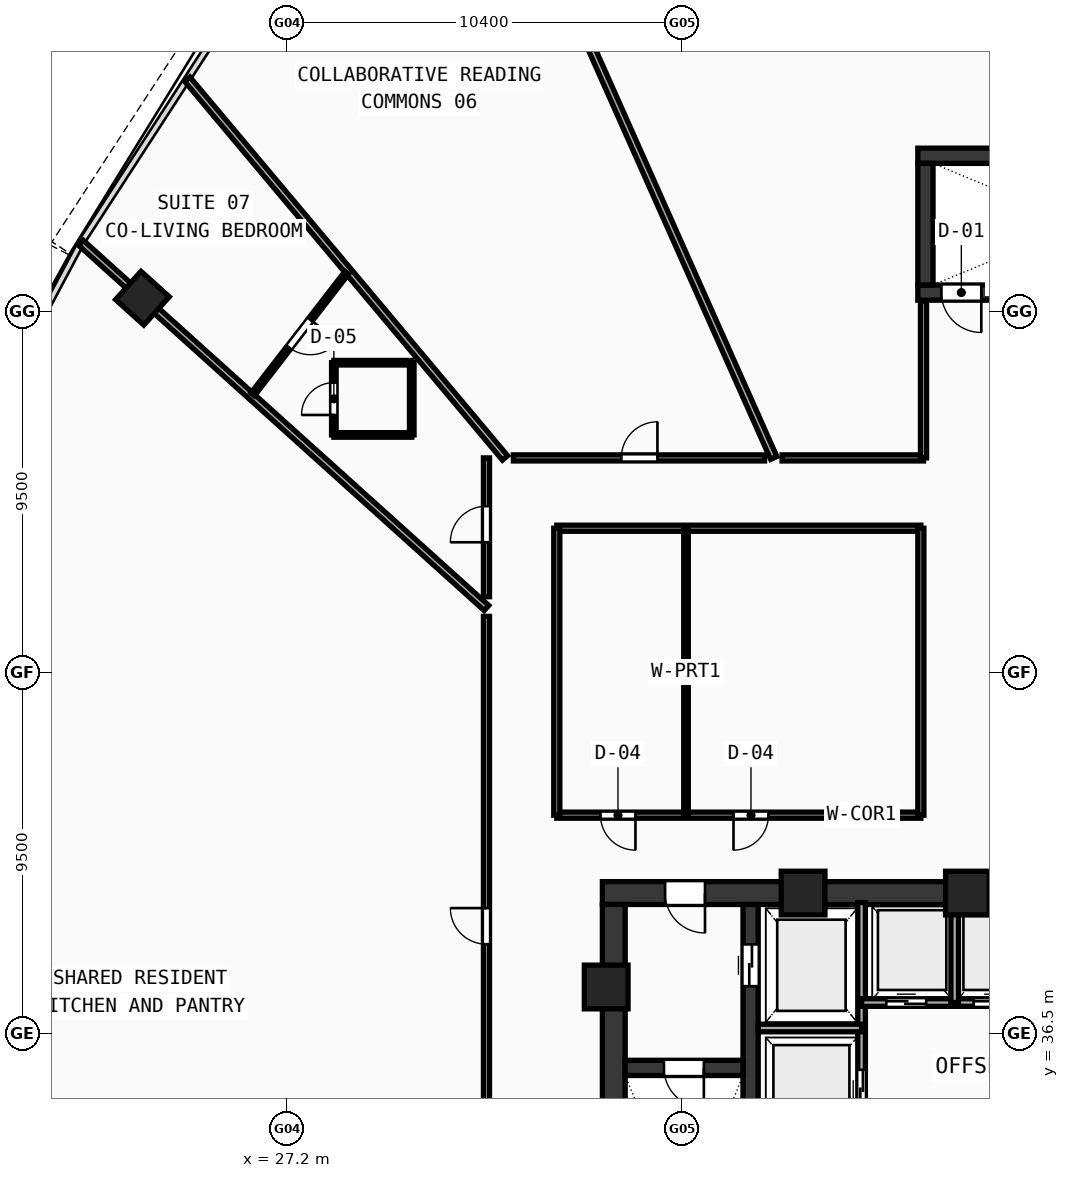
"""IFC4 building model, lengths in metres.
Left out: names, types, materials, properties, quantities, classifications, styles, units other than length and angle.
Written with IfcOpenShell. Run it as: python <this file> out.ifc"""

import sys

from ifc_helpers import new_model, si_unit, direction, frame, frame_2d, origin, origin_with_axes, origin_2d, place, context, subcontext, project, spatial, rectangle, hollow_rectangle, extrude, source, transform, mapped, element, fill, save


model = new_model("IFC4")
c1 = context("Model", 3, precision=1e-05, world=origin(), true_north=direction((0.0, 1.0)))
c2 = subcontext(c1, "Body", "Model", "MODEL_VIEW")
j1 = project(units=[si_unit("LENGTHUNIT", "METRE"), si_unit("PLANEANGLEUNIT", "RADIAN")], contexts=[c1])
p1 = place(None, origin())
s1 = spatial("IfcSite", under=j1, at=p1, CompositionType="ELEMENT")
p2 = place(p1, origin())
s2 = spatial("IfcBuilding", under=s1, at=p2, CompositionType="ELEMENT")
p3 = place(p2, frame((0.0, 0.0, 88.78)))
s3 = spatial("IfcBuildingStorey", under=s2, at=p3, CompositionType="ELEMENT", Elevation=88.78)
p4 = place(p3, frame((35.5, 40.2, 0.0), z_axis=(0.0, 0.0, 1.0), x_axis=(1.0, 0.0, 0.0)))
e1 = element("IfcWall", 1, at=p4, inside=s3, PredefinedType="SHEAR", context=c2, shape_type="SweptSolid", body=[
    extrude(rectangle(XDim=11.3, YDim=0.6, at=frame_2d((5.65, 0.0))), origin(), (0.0, 0.0, 1.0), 3.54),
])
p5 = place(p4, frame((1.65, 0.0, 0.0)))
e2 = element("IfcOpeningElement", 2, at=p5, cuts=e1, PredefinedType="OPENING", context=c2, shape_type="SweptSolid", body=[
    extrude(rectangle(XDim=1.05, YDim=2.1, at=frame_2d((0.525, 1.05))), frame((0.0, 0.31, 0.0), z_axis=(0.0, -1.0, 0.0), x_axis=(1.0, 0.0, 0.0)), (0.0, 0.0, 1.0), 0.62),
])
p6 = place(p3, frame((35.8, 27.8, 0.0), z_axis=(0.0, 0.0, 1.0), x_axis=(0.0, 1.0, 0.0)))
e3 = element("IfcWall", 3, at=p6, inside=s3, PredefinedType="SHEAR", context=c2, shape_type="SweptSolid", body=[
    extrude(rectangle(XDim=12.1, YDim=0.6, at=frame_2d((6.05, 0.0))), origin(), (0.0, 0.0, 1.0), 3.54),
])
p7 = place(p3, frame((39.4, 27.8, 0.0), z_axis=(0.0, 0.0, 1.0), x_axis=(0.0, 1.0, 0.0)))
e4 = element("IfcWall", 4, at=p7, inside=s3, PredefinedType="SHEAR", context=c2, shape_type="SweptSolid", body=[
    extrude(rectangle(XDim=12.1, YDim=0.4, at=frame_2d((6.05, 0.0))), origin(), (0.0, 0.0, 1.0), 3.54),
])
p8 = place(p7, frame((9.95, 0.0, 0.0)))
e5 = element("IfcOpeningElement", 5, at=p8, cuts=e4, PredefinedType="OPENING", context=c2, shape_type="SweptSolid", body=[
    extrude(rectangle(XDim=1.1, YDim=2.1, at=frame_2d((0.55, 1.05))), frame((0.0, 0.21, 0.0), z_axis=(0.0, -1.0, 0.0), x_axis=(1.0, 0.0, 0.0)), (0.0, 0.0, 1.0), 0.42),
])
p9 = place(p3, frame((36.1, 35.6, 0.0), z_axis=(0.0, 0.0, 1.0), x_axis=(1.0, 0.0, 0.0)))
e6 = element("IfcWall", 6, at=p9, inside=s3, PredefinedType="SHEAR", context=c2, shape_type="SweptSolid", body=[
    extrude(rectangle(XDim=3.1, YDim=0.4, at=frame_2d((1.55, 0.0))), origin(), (0.0, 0.0, 1.0), 3.54),
])
p10 = place(p9, frame((1.02, 0.0, 0.0)))
e7 = element("IfcOpeningElement", 7, at=p10, cuts=e6, PredefinedType="OPENING", context=c2, shape_type="SweptSolid", body=[
    extrude(rectangle(XDim=1.05, YDim=2.1, at=frame_2d((0.525, 1.05))), frame((0.0, 0.21, 0.0), z_axis=(0.0, -1.0, 0.0), x_axis=(1.0, 0.0, 0.0)), (0.0, 0.0, 1.0), 0.42),
])
p11 = place(p3, frame((43.8, 59.6, 0.0), z_axis=(0.0, 0.0, 1.0), x_axis=(1.0, 0.0, 0.0)))
e8 = element("IfcWall", 8, at=p11, inside=s3, PredefinedType="SHEAR", context=c2, shape_type="SweptSolid", body=[
    extrude(rectangle(XDim=8.5, YDim=0.4, at=frame_2d((4.25, 0.0))), origin(), (0.0, 0.0, 1.0), 3.54),
])
p12 = place(p3, frame((43.8, 56.0, 0.0), z_axis=(0.0, 0.0, 1.0), x_axis=(1.0, 0.0, 0.0)))
e9 = element("IfcWall", 9, at=p12, inside=s3, PredefinedType="SHEAR", context=c2, shape_type="SweptSolid", body=[
    extrude(rectangle(XDim=8.5, YDim=0.4, at=frame_2d((4.25, 0.0))), origin(), (0.0, 0.0, 1.0), 3.54),
])
p13 = place(p12, frame((0.62, 0.0, 0.0)))
e10 = element("IfcOpeningElement", 10, at=p13, cuts=e9, PredefinedType="OPENING", context=c2, shape_type="SweptSolid", body=[
    extrude(rectangle(XDim=1.05, YDim=2.1, at=frame_2d((0.525, 1.05))), frame((0.0, 0.21, 0.0), z_axis=(0.0, -1.0, 0.0), x_axis=(1.0, 0.0, 0.0)), (0.0, 0.0, 1.0), 0.42),
])
p14 = place(p3, frame((44.0, 56.2, 0.0), z_axis=(0.0, 0.0, 1.0), x_axis=(0.0, 1.0, 0.0)))
e11 = element("IfcWall", 11, at=p14, inside=s3, PredefinedType="SHEAR", context=c2, shape_type="SweptSolid", body=[
    extrude(rectangle(XDim=3.2, YDim=0.4, at=frame_2d((1.6, 0.0))), origin(), (0.0, 0.0, 1.0), 3.54),
])
m1 = source(origin(), c2, "Body", "SweptSolid", [
    extrude(hollow_rectangle(XDim=1.15, YDim=1.15, WallThickness=0.048, at=origin_2d()), origin(), (0.0, 0.0, 1.0), 3.8),
])
for number, where, z_axis, x_axis in (
    (12, (45.106, 40.2, -0.26), (0.0, 0.0, 1.0), (1.0, 0.0, 0.0)),
    (13, (40.781, 40.2, -0.26), (0.0, 0.0, 1.0), (1.0, 0.0, 0.0)),
    (14, (35.6, 37.729, -0.26), (0.0, 0.0, 1.0), (1.0, 0.0, 0.0)),
):
    element("IfcColumn", number, at=place(p3, frame(where, z_axis=z_axis, x_axis=x_axis)), inside=s3, PredefinedType="COLUMN", context=c2, shape_type="MappedRepresentation", body=[
        mapped(m1, transform((0.0, 0.0, 0.0), scale=1.0)),
    ])
m2 = source(origin(), c2, "Body", "SweptSolid", [
    extrude(hollow_rectangle(XDim=1.0, YDim=1.0, WallThickness=0.042, at=origin_2d()), origin(), (0.0, 0.0, 1.0), 3.8),
])
p15 = place(p3, frame((23.397, 55.852, -0.26), z_axis=(0.0, 0.0, 1.0), x_axis=(-0.669130606359, -0.743144825477, 0.0)))
e15 = element("IfcColumn", 15, at=p15, inside=s3, PredefinedType="COLUMN", context=c2, shape_type="MappedRepresentation", body=[
    mapped(m2, transform((0.0, 0.0, 0.0), scale=1.0)),
])
p16 = place(p3, frame((42.32, 33.5, 0.0), z_axis=(0.0, 0.0, 1.0), x_axis=(0.0, 1.0, 0.0)))
e16 = element("IfcWall", 16, at=p16, inside=s3, PredefinedType="SOLIDWALL", context=c2, shape_type="SweptSolid", body=[
    extrude(rectangle(XDim=6.45, YDim=0.2, at=frame_2d((3.225, 0.0))), origin(), (0.0, 0.0, 1.0), 3.54),
])
p17 = place(p16, frame((1.0, 0.0, 0.0)))
e17 = element("IfcOpeningElement", 17, at=p17, cuts=e16, PredefinedType="OPENING", context=c2, shape_type="SweptSolid", body=[
    extrude(rectangle(XDim=1.05, YDim=2.1, at=frame_2d((0.525, 1.05))), frame((0.0, 0.11, 0.0), z_axis=(0.0, -1.0, 0.0), x_axis=(1.0, 0.0, 0.0)), (0.0, 0.0, 1.0), 0.22),
])
p18 = place(p3, frame((39.6, 36.65, 0.0), z_axis=(0.0, 0.0, 1.0), x_axis=(1.0, 0.0, 0.0)))
e18 = element("IfcWall", 18, at=p18, inside=s3, PredefinedType="SOLIDWALL", context=c2, shape_type="SweptSolid", body=[
    extrude(rectangle(XDim=2.72, YDim=0.2, at=frame_2d((1.36, 0.0))), origin(), (0.0, 0.0, 1.0), 3.54),
])
p19 = place(p3, frame((42.32, 37.32, 0.0), z_axis=(0.0, 0.0, 1.0), x_axis=(1.0, 0.0, 0.0)))
e19 = element("IfcWall", 19, at=p19, inside=s3, PredefinedType="SOLIDWALL", context=c2, shape_type="SweptSolid", body=[
    extrude(rectangle(XDim=4.73, YDim=0.2, at=frame_2d((2.365, 0.0))), origin(), (0.0, 0.0, 1.0), 3.54),
])
p20 = place(p19, frame((0.65, 0.0, 0.0)))
e20 = element("IfcOpeningElement", 20, at=p20, cuts=e19, PredefinedType="OPENING", context=c2, shape_type="SweptSolid", body=[
    extrude(rectangle(XDim=1.05, YDim=2.1, at=frame_2d((0.525, 1.05))), frame((0.0, 0.11, 0.0), z_axis=(0.0, -1.0, 0.0), x_axis=(1.0, 0.0, 0.0)), (0.0, 0.0, 1.0), 0.22),
])
p21 = place(p19, frame((2.95, 0.0, 0.0)))
e21 = element("IfcOpeningElement", 21, at=p21, cuts=e19, PredefinedType="OPENING", context=c2, shape_type="SweptSolid", body=[
    extrude(rectangle(XDim=1.05, YDim=2.1, at=frame_2d((0.525, 1.05))), frame((0.0, 0.11, 0.0), z_axis=(0.0, -1.0, 0.0), x_axis=(1.0, 0.0, 0.0)), (0.0, 0.0, 1.0), 0.22),
])
p22 = place(p3, frame((44.77, 37.32, 0.0), z_axis=(0.0, 0.0, 1.0), x_axis=(0.0, 1.0, 0.0)))
e22 = element("IfcWall", 22, at=p22, inside=s3, PredefinedType="SOLIDWALL", context=c2, shape_type="SweptSolid", body=[
    extrude(rectangle(XDim=2.63, YDim=0.2, at=frame_2d((1.315, 0.0))), origin(), (0.0, 0.0, 1.0), 3.54),
])
p23 = place(p3, frame((34.3, 42.25, 0.0), z_axis=(0.0, 0.0, 1.0), x_axis=(1.0, 0.0, 0.0)))
e23 = element("IfcWall", 23, at=p23, inside=s3, PredefinedType="PARTITIONING", context=c2, shape_type="SweptSolid", body=[
    extrude(rectangle(XDim=9.58, YDim=0.16, at=frame_2d((4.79, 0.0))), origin(), (0.0, 0.0, 1.0), 2.84),
])
p24 = place(p23, frame((1.15, 0.0, 0.0)))
e24 = element("IfcOpeningElement", 24, at=p24, cuts=e23, PredefinedType="OPENING", context=c2, shape_type="SweptSolid", body=[
    extrude(rectangle(XDim=0.92, YDim=2.1, at=frame_2d((0.46, 1.05))), frame((0.0, 0.09, 0.0), z_axis=(0.0, -1.0, 0.0), x_axis=(1.0, 0.0, 0.0)), (0.0, 0.0, 1.0), 0.18),
])
p25 = place(p23, frame((4.65, 0.0, 0.0)))
e25 = element("IfcOpeningElement", 25, at=p25, cuts=e23, PredefinedType="OPENING", context=c2, shape_type="SweptSolid", body=[
    extrude(rectangle(XDim=0.92, YDim=2.1, at=frame_2d((0.46, 1.05))), frame((0.0, 0.09, 0.0), z_axis=(0.0, -1.0, 0.0), x_axis=(1.0, 0.0, 0.0)), (0.0, 0.0, 1.0), 0.18),
])
p26 = place(p3, frame((34.3, 49.8, 0.0), z_axis=(0.0, 0.0, 1.0), x_axis=(1.0, 0.0, 0.0)))
e26 = element("IfcWall", 26, at=p26, inside=s3, PredefinedType="PARTITIONING", context=c2, shape_type="SweptSolid", body=[
    extrude(rectangle(XDim=9.58, YDim=0.16, at=frame_2d((4.79, 0.0))), origin(), (0.0, 0.0, 1.0), 2.84),
])
for number, where, z_axis, x_axis in (
    (27, (34.3, 42.25, 0.0), (0.0, 0.0, 1.0), (0.0, 1.0, 0.0)),
    (28, (43.88, 42.25, 0.0), (0.0, 0.0, 1.0), (0.0, 1.0, 0.0)),
):
    element("IfcWall", number, at=place(p3, frame(where, z_axis=z_axis, x_axis=x_axis)), inside=s3, PredefinedType="PARTITIONING", context=c2, shape_type="SweptSolid", body=[
        extrude(rectangle(XDim=7.55, YDim=0.16, at=frame_2d((3.775, 0.0))), origin(), (0.0, 0.0, 1.0), 2.84),
    ])
p27 = place(p3, frame((37.7, 42.25, 0.0), z_axis=(0.0, 0.0, 1.0), x_axis=(0.0, 1.0, 0.0)))
e29 = element("IfcWall", 29, at=p27, inside=s3, PredefinedType="PARTITIONING", context=c2, shape_type="SweptSolid", body=[
    extrude(rectangle(XDim=7.55, YDim=0.12, at=frame_2d((3.775, 0.0))), origin(), (0.0, 0.0, 1.0), 2.84),
])
p28 = place(p3, frame((40.008, 51.65, 0.0), z_axis=(0.0, 0.0, 1.0), x_axis=(-0.406733854264, 0.913546699296, 0.0)))
e30 = element("IfcWall", 30, at=p28, inside=s3, PredefinedType="PARTITIONING", context=c2, shape_type="SweptSolid", body=[
    extrude(rectangle(XDim=21.911, YDim=0.18, at=frame_2d((10.956, 0.0))), origin(), (0.0, 0.0, 1.0), 2.84),
])
p29 = place(p3, frame((32.938, 51.65, 0.0), z_axis=(0.0, 0.0, 1.0), x_axis=(-0.642792408097, 0.766040416749, 0.0)))
e31 = element("IfcWall", 31, at=p29, inside=s3, PredefinedType="PARTITIONING", context=c2, shape_type="SweptSolid", body=[
    extrude(rectangle(XDim=13.01, YDim=0.18, at=frame_2d((6.505, 0.0))), origin(), (0.0, 0.0, 1.0), 2.84),
])
p30 = place(p3, frame((32.45, 47.701, 0.0), z_axis=(0.0, 0.0, 1.0), x_axis=(-0.743147852162, 0.66912724487, 0.0)))
e32 = element("IfcWall", 32, at=p30, inside=s3, PredefinedType="PARTITIONING", context=c2, shape_type="SweptSolid", body=[
    extrude(rectangle(XDim=14.357, YDim=0.18, at=frame_2d((7.179, 0.0))), origin(), (0.0, 0.0, 1.0), 2.84),
])
p31 = place(p3, frame((32.45, 31.178, 0.0), z_axis=(0.0, 0.0, 1.0), x_axis=(0.0, 1.0, 0.0)))
e33 = element("IfcWall", 33, at=p31, inside=s3, PredefinedType="PARTITIONING", context=c2, shape_type="SweptSolid", body=[
    extrude(rectangle(XDim=16.304, YDim=0.16, at=frame_2d((8.152, 0.0))), origin(), (0.0, 0.0, 1.0), 2.84),
])
p32 = place(p31, frame((7.677, 0.0, 0.0)))
e34 = element("IfcOpeningElement", 34, at=p32, cuts=e33, PredefinedType="OPENING", context=c2, shape_type="SweptSolid", body=[
    extrude(rectangle(XDim=0.95, YDim=2.1, at=frame_2d((0.475, 1.05))), frame((0.0, 0.09, 0.0), z_axis=(0.0, -1.0, 0.0), x_axis=(1.0, 0.0, 0.0)), (0.0, 0.0, 1.0), 0.18),
])
p33 = place(p3, frame((32.45, 47.997, 0.0), z_axis=(0.0, 0.0, 1.0), x_axis=(0.0, 1.0, 0.0)))
e35 = element("IfcWall", 35, at=p33, inside=s3, PredefinedType="PARTITIONING", context=c2, shape_type="SweptSolid", body=[
    extrude(rectangle(XDim=3.653, YDim=0.16, at=frame_2d((1.826, 0.0))), origin(), (0.0, 0.0, 1.0), 3.54),
])
p34 = place(p33, frame((1.433, 0.0, 0.0)))
e36 = element("IfcOpeningElement", 36, at=p34, cuts=e35, PredefinedType="OPENING", context=c2, shape_type="SweptSolid", body=[
    extrude(rectangle(XDim=0.95, YDim=2.1, at=frame_2d((0.475, 1.05))), frame((0.0, 0.09, 0.0), z_axis=(0.0, -1.0, 0.0), x_axis=(1.0, 0.0, 0.0)), (0.0, 0.0, 1.0), 0.18),
])
p35 = place(p3, frame((33.158, 51.65, 0.0), z_axis=(0.0, 0.0, 1.0), x_axis=(1.0, 0.0, 0.0)))
e37 = element("IfcWall", 37, at=p35, inside=s3, PredefinedType="PARTITIONING", context=c2, shape_type="SweptSolid", body=[
    extrude(rectangle(XDim=6.609, YDim=0.16, at=frame_2d((3.305, 0.0))), origin(), (0.0, 0.0, 1.0), 3.54),
])
p36 = place(p35, frame((2.84, 0.0, 0.0)))
e38 = element("IfcOpeningElement", 38, at=p36, cuts=e37, PredefinedType="OPENING", context=c2, shape_type="SweptSolid", body=[
    extrude(rectangle(XDim=0.95, YDim=2.1, at=frame_2d((0.475, 1.05))), frame((0.0, 0.09, 0.0), z_axis=(0.0, -1.0, 0.0), x_axis=(1.0, 0.0, 0.0)), (0.0, 0.0, 1.0), 0.18),
])
p37 = place(p3, frame((40.228, 51.65, 0.0), z_axis=(0.0, 0.0, 1.0), x_axis=(1.0, 0.0, 0.0)))
e39 = element("IfcWall", 39, at=p37, inside=s3, PredefinedType="PARTITIONING", context=c2, shape_type="SweptSolid", body=[
    extrude(rectangle(XDim=3.722, YDim=0.16, at=frame_2d((1.861, 0.0))), origin(), (0.0, 0.0, 1.0), 2.84),
])
p38 = place(p3, frame((43.95, 51.65, 0.0), z_axis=(0.0, 0.0, 1.0), x_axis=(0.0, 1.0, 0.0)))
e40 = element("IfcWall", 40, at=p38, inside=s3, PredefinedType="PARTITIONING", context=c2, shape_type="SweptSolid", body=[
    extrude(rectangle(XDim=4.13, YDim=0.16, at=frame_2d((2.065, 0.0))), origin(), (0.0, 0.0, 1.0), 3.54),
])
p39 = place(p3, frame((28.434, 52.255, 0.0), z_axis=(0.0, 0.0, 1.0), x_axis=(1.0, 0.0, 0.0)))
e41 = element("IfcWall", 41, at=p39, inside=s3, PredefinedType="PARTITIONING", context=c2, shape_type="SweptSolid", body=[
    extrude(rectangle(XDim=2.05, YDim=0.12, at=frame_2d((1.025, 0.0))), origin(), (0.0, 0.0, 1.0), 3.14),
])
p40 = place(p3, frame((30.484, 52.255, 0.0), z_axis=(0.0, 0.0, 1.0), x_axis=(0.0, 1.0, 0.0)))
e42 = element("IfcWall", 42, at=p40, inside=s3, PredefinedType="PARTITIONING", context=c2, shape_type="SweptSolid", body=[
    extrude(rectangle(XDim=1.9, YDim=0.12, at=frame_2d((0.95, 0.0))), origin(), (0.0, 0.0, 1.0), 3.14),
])
p41 = place(p3, frame((30.484, 54.155, 0.0), z_axis=(0.0, 0.0, 1.0), x_axis=(-1.0, 0.0, 0.0)))
e43 = element("IfcWall", 43, at=p41, inside=s3, PredefinedType="PARTITIONING", context=c2, shape_type="SweptSolid", body=[
    extrude(rectangle(XDim=2.05, YDim=0.12, at=frame_2d((1.025, 0.0))), origin(), (0.0, 0.0, 1.0), 3.54),
])
p42 = place(p3, frame((28.434, 54.155, 0.0), z_axis=(0.0, 0.0, 1.0), x_axis=(0.0, -1.0, 0.0)))
e44 = element("IfcWall", 44, at=p42, inside=s3, PredefinedType="PARTITIONING", context=c2, shape_type="SweptSolid", body=[
    extrude(rectangle(XDim=1.9, YDim=0.12, at=frame_2d((0.95, 0.0))), origin(), (0.0, 0.0, 1.0), 3.54),
])
p43 = place(p42, frame((0.525, 0.0, 0.0)))
e45 = element("IfcOpeningElement", 45, at=p43, cuts=e44, PredefinedType="OPENING", context=c2, shape_type="SweptSolid", body=[
    extrude(rectangle(XDim=0.85, YDim=2.1, at=frame_2d((0.425, 1.05))), frame((0.0, 0.07, 0.0), z_axis=(0.0, -1.0, 0.0), x_axis=(1.0, 0.0, 0.0)), (0.0, 0.0, 1.0), 0.14),
])
p44 = place(p3, frame((28.772, 56.521, 0.0), z_axis=(0.0, 0.0, 1.0), x_axis=(-0.611610665825, -0.791158892669, 0.0)))
e46 = element("IfcWall", 46, at=p44, inside=s3, PredefinedType="PARTITIONING", context=c2, shape_type="SweptSolid", body=[
    extrude(rectangle(XDim=4.045, YDim=0.12, at=frame_2d((2.022, 0.0))), origin(), (0.0, 0.0, 1.0), 2.84),
])
p45 = place(p44, frame((1.562, 0.0, 0.0)))
e47 = element("IfcOpeningElement", 47, at=p45, cuts=e46, PredefinedType="OPENING", context=c2, shape_type="SweptSolid", body=[
    extrude(rectangle(XDim=0.92, YDim=2.1, at=frame_2d((0.46, 1.05))), frame((0.0, 0.07, 0.0), z_axis=(0.0, -1.0, 0.0), x_axis=(1.0, 0.0, 0.0)), (0.0, 0.0, 1.0), 0.14),
])
m3 = source(origin(), c2, "Body", "SweptSolid", [
    extrude(rectangle(XDim=1.05, YDim=2.1, at=frame_2d((0.525, 1.05))), frame((0.0, 0.025, 0.0), z_axis=(0.0, -1.0, 0.0), x_axis=(1.0, 0.0, 0.0)), (0.0, 0.0, 1.0), 0.05),
])
p46 = place(p10, frame((1.05, 0.0, 0.0), z_axis=(0.0, 0.0, 1.0), x_axis=(-1.0, 0.0, 0.0)))
e48 = element("IfcDoor", 48, at=p46, inside=s3, OperationType="SINGLE_SWING_LEFT", PredefinedType="DOOR", context=c2, shape_type="MappedRepresentation", body=[
    mapped(m3, transform((0.0, 0.0, 0.0), scale=1.0)),
])
fill(e7, e48)
p47 = place(p5, frame((1.05, 0.0, 0.0), z_axis=(0.0, 0.0, 1.0), x_axis=(-1.0, 0.0, 0.0)))
e49 = element("IfcDoor", 49, at=p47, inside=s3, OperationType="SINGLE_SWING_LEFT", PredefinedType="DOOR", context=c2, shape_type="MappedRepresentation", body=[
    mapped(m3, transform((0.0, 0.0, 0.0), scale=1.0)),
])
fill(e2, e49)
m4 = source(origin(), c2, "Body", "SweptSolid", [
    extrude(rectangle(XDim=1.1, YDim=2.1, at=frame_2d((0.55, 1.05))), frame((0.0, 0.025, 0.0), z_axis=(0.0, -1.0, 0.0), x_axis=(1.0, 0.0, 0.0)), (0.0, 0.0, 1.0), 0.05),
])
p48 = place(p8, frame((1.1, 0.0, 0.0), z_axis=(0.0, 0.0, 1.0), x_axis=(-1.0, 0.0, 0.0)))
e50 = element("IfcDoor", 50, at=p48, inside=s3, OperationType="DOUBLE_DOOR_SLIDING", PredefinedType="DOOR", context=c2, shape_type="MappedRepresentation", body=[
    mapped(m4, transform((0.0, 0.0, 0.0), scale=1.0)),
])
fill(e5, e50)
p49 = place(p17, origin_with_axes())
e51 = element("IfcDoor", 51, at=p49, inside=s3, OperationType="DOUBLE_DOOR_SLIDING", PredefinedType="DOOR", context=c2, shape_type="MappedRepresentation", body=[
    mapped(m3, transform((0.0, 0.0, 0.0), scale=1.0)),
])
fill(e17, e51)
p50 = place(p20, frame((1.05, 0.0, 0.0), z_axis=(0.0, 0.0, 1.0), x_axis=(-1.0, 0.0, 0.0)))
e52 = element("IfcDoor", 52, at=p50, inside=s3, OperationType="DOUBLE_DOOR_SLIDING", PredefinedType="DOOR", context=c2, shape_type="MappedRepresentation", body=[
    mapped(m3, transform((0.0, 0.0, 0.0), scale=1.0)),
])
fill(e20, e52)
p51 = place(p21, frame((1.05, 0.0, 0.0), z_axis=(0.0, 0.0, 1.0), x_axis=(-1.0, 0.0, 0.0)))
e53 = element("IfcDoor", 53, at=p51, inside=s3, OperationType="DOUBLE_DOOR_SLIDING", PredefinedType="DOOR", context=c2, shape_type="MappedRepresentation", body=[
    mapped(m3, transform((0.0, 0.0, 0.0), scale=1.0)),
])
fill(e21, e53)
p52 = place(p13, frame((1.05, 0.0, 0.0), z_axis=(0.0, 0.0, 1.0), x_axis=(-1.0, 0.0, 0.0)))
e54 = element("IfcDoor", 54, at=p52, inside=s3, OperationType="SINGLE_SWING_LEFT", PredefinedType="DOOR", context=c2, shape_type="MappedRepresentation", body=[
    mapped(m3, transform((0.0, 0.0, 0.0), scale=1.0)),
])
fill(e10, e54)
m5 = source(origin(), c2, "Body", "SweptSolid", [
    extrude(rectangle(XDim=0.92, YDim=2.1, at=frame_2d((0.46, 1.05))), frame((0.0, 0.025, 0.0), z_axis=(0.0, -1.0, 0.0), x_axis=(1.0, 0.0, 0.0)), (0.0, 0.0, 1.0), 0.05),
])
p53 = place(p24, frame((0.92, 0.0, 0.0), z_axis=(0.0, 0.0, 1.0), x_axis=(-1.0, 0.0, 0.0)))
e55 = element("IfcDoor", 55, at=p53, inside=s3, OperationType="SINGLE_SWING_LEFT", PredefinedType="DOOR", context=c2, shape_type="MappedRepresentation", body=[
    mapped(m5, transform((0.0, 0.0, 0.0), scale=1.0)),
])
fill(e24, e55)
p54 = place(p25, frame((0.92, 0.0, 0.0), z_axis=(0.0, 0.0, 1.0), x_axis=(-1.0, 0.0, 0.0)))
e56 = element("IfcDoor", 56, at=p54, inside=s3, OperationType="SINGLE_SWING_RIGHT", PredefinedType="DOOR", context=c2, shape_type="MappedRepresentation", body=[
    mapped(m5, transform((0.0, 0.0, 0.0), scale=1.0)),
])
fill(e25, e56)
m6 = source(origin(), c2, "Body", "SweptSolid", [
    extrude(rectangle(XDim=0.95, YDim=2.1, at=frame_2d((0.475, 1.05))), frame((0.0, 0.025, 0.0), z_axis=(0.0, -1.0, 0.0), x_axis=(1.0, 0.0, 0.0)), (0.0, 0.0, 1.0), 0.05),
])
p55 = place(p36, origin_with_axes())
e57 = element("IfcDoor", 57, at=p55, inside=s3, OperationType="SINGLE_SWING_RIGHT", PredefinedType="DOOR", context=c2, shape_type="MappedRepresentation", body=[
    mapped(m6, transform((0.0, 0.0, 0.0), scale=1.0)),
])
fill(e38, e57)
p56 = place(p34, origin_with_axes())
e58 = element("IfcDoor", 58, at=p56, inside=s3, OperationType="SINGLE_SWING_LEFT", PredefinedType="DOOR", context=c2, shape_type="MappedRepresentation", body=[
    mapped(m6, transform((0.0, 0.0, 0.0), scale=1.0)),
])
fill(e36, e58)
m7 = source(origin(), c2, "Body", "SweptSolid", [
    extrude(rectangle(XDim=0.85, YDim=2.1, at=frame_2d((0.425, 1.05))), frame((0.0, 0.025, 0.0), z_axis=(0.0, -1.0, 0.0), x_axis=(1.0, 0.0, 0.0)), (0.0, 0.0, 1.0), 0.05),
])
p57 = place(p43, frame((0.85, 0.0, 0.0), z_axis=(0.0, 0.0, 1.0), x_axis=(-1.0, 0.0, 0.0)))
e59 = element("IfcDoor", 59, at=p57, inside=s3, OperationType="SINGLE_SWING_LEFT", PredefinedType="DOOR", context=c2, shape_type="MappedRepresentation", body=[
    mapped(m7, transform((0.0, 0.0, 0.0), scale=1.0)),
])
fill(e45, e59)
p58 = place(p45, origin_with_axes())
e60 = element("IfcDoor", 60, at=p58, inside=s3, OperationType="SINGLE_SWING_LEFT", PredefinedType="DOOR", context=c2, shape_type="MappedRepresentation", body=[
    mapped(m5, transform((0.0, 0.0, 0.0), scale=1.0)),
])
fill(e47, e60)
p59 = place(p32, origin_with_axes())
e61 = element("IfcDoor", 61, at=p59, inside=s3, OperationType="SINGLE_SWING_RIGHT", PredefinedType="DOOR", context=c2, shape_type="MappedRepresentation", body=[
    mapped(m6, transform((0.0, 0.0, 0.0), scale=1.0)),
])
fill(e34, e61)
save(model, sys.argv[1])
